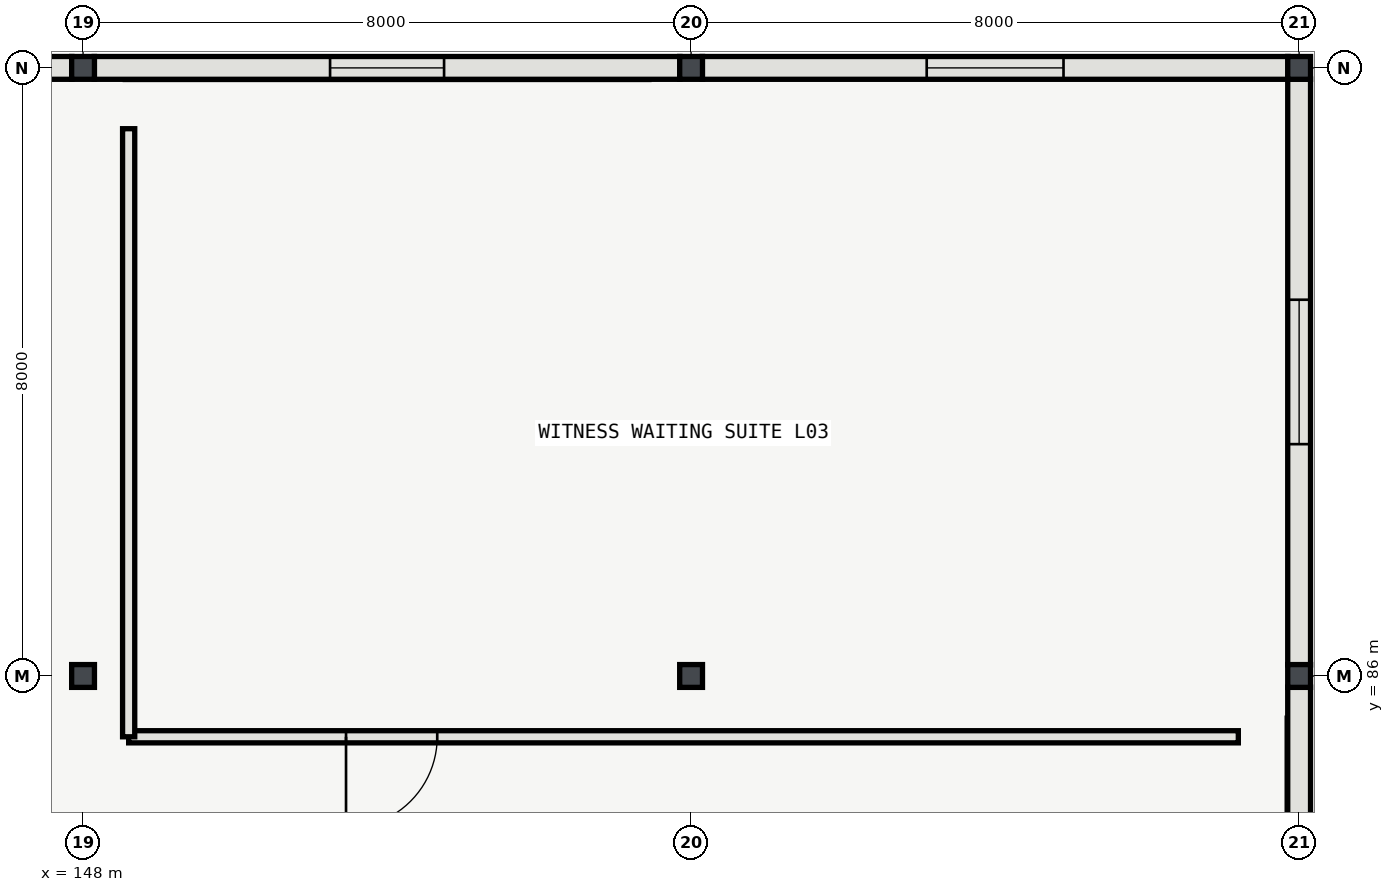
"""IFC4 building model, lengths in metres.
Left out: names, types, materials, properties, quantities, classifications, styles, units other than length and angle.
Written with IfcOpenShell. Run it as: python <this file> out.ifc"""

import sys

from ifc_helpers import new_model, si_unit, direction, frame, frame_2d, origin, origin_2d, place, context, subcontext, project, spatial, rectangle, i_section, extrude, element, fill, save


model = new_model("IFC4")
c1 = context("Model", 3, precision=1e-05, world=origin(), true_north=direction((0.0, 1.0)))
c2 = subcontext(c1, "Body", "Model", "MODEL_VIEW")
j1 = project(units=[si_unit("LENGTHUNIT", "METRE"), si_unit("PLANEANGLEUNIT", "RADIAN")], contexts=[c1])
p1 = place(None, origin())
s1 = spatial("IfcSite", under=j1, at=p1, CompositionType="ELEMENT")
p2 = place(p1, origin())
s2 = spatial("IfcBuilding", under=s1, at=p2, CompositionType="ELEMENT")
p3 = place(p2, frame((0.0, 0.0, 16.2)))
s3 = spatial("IfcBuildingStorey", under=s2, at=p3, CompositionType="ELEMENT", Elevation=16.2)
for number, where, z_axis, x_axis in (
    (1, (148.0, 86.0, 0.0), (0.0, 0.0, 1.0), (1.0, 0.0, 0.0)),
    (2, (148.0, 94.0, 0.0), (0.0, 0.0, 1.0), (1.0, 0.0, 0.0)),
    (3, (156.0, 86.0, 0.0), (0.0, 0.0, 1.0), (1.0, 0.0, 0.0)),
    (4, (156.0, 94.0, 0.0), (0.0, 0.0, 1.0), (1.0, 0.0, 0.0)),
    (5, (164.0, 86.0, 0.0), (0.0, 0.0, 1.0), (1.0, 0.0, 0.0)),
    (6, (164.0, 94.0, 0.0), (0.0, 0.0, 1.0), (1.0, 0.0, 0.0)),
):
    element("IfcColumn", number, at=place(p3, frame(where, z_axis=z_axis, x_axis=x_axis)), inside=s3, PredefinedType="COLUMN", context=c2, shape_type="SweptSolid", body=[
        extrude(i_section(OverallWidth=0.3, OverallDepth=0.3, WebThickness=0.01, FlangeThickness=0.015, FilletRadius=0.018, at=origin_2d()), origin(), (0.0, 0.0, 1.0), 4.2),
    ])
p4 = place(p3, frame((147.854, 94.0, 0.0), z_axis=(0.0, 0.0, 1.0), x_axis=(-1.0, 0.0, 0.0)))
e7 = element("IfcWall", 7, at=p4, inside=s3, PredefinedType="SOLIDWALL", context=c2, shape_type="SweptSolid", body=[
    extrude(rectangle(XDim=7.708, YDim=0.3, at=frame_2d((3.854, 0.0))), origin(), (0.0, 0.0, 1.0), 3.423),
])
p5 = place(p4, frame((2.654, 0.0, 0.95)))
e8 = element("IfcOpeningElement", 8, at=p5, cuts=e7, PredefinedType="OPENING", context=c2, shape_type="SweptSolid", body=[
    extrude(rectangle(XDim=2.4, YDim=1.8, at=frame_2d((1.2, 0.9))), frame((0.0, 0.16, 0.0), z_axis=(0.0, -1.0, 0.0), x_axis=(1.0, 0.0, 0.0)), (0.0, 0.0, 1.0), 0.32),
])
p6 = place(p3, frame((155.854, 94.0, 0.0), z_axis=(0.0, 0.0, 1.0), x_axis=(-1.0, 0.0, 0.0)))
e9 = element("IfcWall", 9, at=p6, inside=s3, PredefinedType="SOLIDWALL", context=c2, shape_type="SweptSolid", body=[
    extrude(rectangle(XDim=7.708, YDim=0.3, at=frame_2d((3.854, 0.0))), origin(), (0.0, 0.0, 1.0), 3.423),
])
p7 = place(p6, frame((3.104, 0.0, 0.95)))
e10 = element("IfcOpeningElement", 10, at=p7, cuts=e9, PredefinedType="OPENING", context=c2, shape_type="SweptSolid", body=[
    extrude(rectangle(XDim=1.5, YDim=1.2, at=frame_2d((0.75, 0.6))), frame((0.0, 0.16, 0.0), z_axis=(0.0, -1.0, 0.0), x_axis=(1.0, 0.0, 0.0)), (0.0, 0.0, 1.0), 0.32),
])
p8 = place(p3, frame((163.854, 94.0, 0.0), z_axis=(0.0, 0.0, 1.0), x_axis=(-1.0, 0.0, 0.0)))
e11 = element("IfcWall", 11, at=p8, inside=s3, PredefinedType="SOLIDWALL", context=c2, shape_type="SweptSolid", body=[
    extrude(rectangle(XDim=7.708, YDim=0.3, at=frame_2d((3.854, 0.0))), origin(), (0.0, 0.0, 1.0), 3.423),
])
p9 = place(p8, frame((2.954, 0.0, 0.95)))
e12 = element("IfcOpeningElement", 12, at=p9, cuts=e11, PredefinedType="OPENING", context=c2, shape_type="SweptSolid", body=[
    extrude(rectangle(XDim=1.8, YDim=1.2, at=frame_2d((0.9, 0.6))), frame((0.0, 0.16, 0.0), z_axis=(0.0, -1.0, 0.0), x_axis=(1.0, 0.0, 0.0)), (0.0, 0.0, 1.0), 0.32),
])
p10 = place(p3, frame((164.0, 78.146, 0.0), z_axis=(0.0, 0.0, 1.0), x_axis=(0.0, 1.0, 0.0)))
e13 = element("IfcWall", 13, at=p10, inside=s3, PredefinedType="SOLIDWALL", context=c2, shape_type="SweptSolid", body=[
    extrude(rectangle(XDim=7.708, YDim=0.3, at=frame_2d((3.854, 0.0))), origin(), (0.0, 0.0, 1.0), 3.383),
])
p11 = place(p10, frame((2.979, 0.0, 0.95)))
e14 = element("IfcOpeningElement", 14, at=p11, cuts=e13, PredefinedType="OPENING", context=c2, shape_type="SweptSolid", body=[
    extrude(rectangle(XDim=1.75, YDim=1.6, at=frame_2d((0.875, 0.8))), frame((0.0, 0.16, 0.0), z_axis=(0.0, -1.0, 0.0), x_axis=(1.0, 0.0, 0.0)), (0.0, 0.0, 1.0), 0.32),
])
p12 = place(p3, frame((164.0, 86.146, 0.0), z_axis=(0.0, 0.0, 1.0), x_axis=(0.0, 1.0, 0.0)))
e15 = element("IfcWall", 15, at=p12, inside=s3, PredefinedType="SOLIDWALL", context=c2, shape_type="SweptSolid", body=[
    extrude(rectangle(XDim=7.708, YDim=0.3, at=frame_2d((3.854, 0.0))), origin(), (0.0, 0.0, 1.0), 3.383),
])
p13 = place(p12, frame((2.904, 0.0, 0.95)))
e16 = element("IfcOpeningElement", 16, at=p13, cuts=e15, PredefinedType="OPENING", context=c2, shape_type="SweptSolid", body=[
    extrude(rectangle(XDim=1.9, YDim=1.6, at=frame_2d((0.95, 0.8))), frame((0.0, 0.16, 0.0), z_axis=(0.0, -1.0, 0.0), x_axis=(1.0, 0.0, 0.0)), (0.0, 0.0, 1.0), 0.32),
])
p14 = place(p3, frame((148.6, 85.2, 0.0), z_axis=(0.0, 0.0, 1.0), x_axis=(1.0, 0.0, 0.0)))
e17 = element("IfcWall", 17, at=p14, inside=s3, PredefinedType="PARTITIONING", context=c2, shape_type="SweptSolid", body=[
    extrude(rectangle(XDim=14.6, YDim=0.16, at=frame_2d((7.3, 0.0))), origin(), (0.0, 0.0, 1.0), 3.92),
])
p15 = place(p14, frame((2.86, 0.0, 0.0)))
e18 = element("IfcOpeningElement", 18, at=p15, cuts=e17, PredefinedType="OPENING", context=c2, shape_type="SweptSolid", body=[
    extrude(rectangle(XDim=1.2, YDim=2.2, at=frame_2d((0.6, 1.1))), frame((0.0, 0.09, 0.0), z_axis=(0.0, -1.0, 0.0), x_axis=(1.0, 0.0, 0.0)), (0.0, 0.0, 1.0), 0.18),
])
p16 = place(p3, frame((148.6, 93.2, 0.0), z_axis=(0.0, 0.0, 1.0), x_axis=(0.0, -1.0, 0.0)))
e19 = element("IfcWall", 19, at=p16, inside=s3, PredefinedType="PARTITIONING", context=c2, shape_type="SweptSolid", body=[
    extrude(rectangle(XDim=8.0, YDim=0.16, at=frame_2d((4.0, 0.0))), origin(), (0.0, 0.0, 1.0), 3.92),
])
p17 = place(p7, origin())
e20 = element("IfcWindow", 20, at=p17, inside=s3, PartitioningType="SINGLE_PANEL", PredefinedType="WINDOW", context=c2, shape_type="SweptSolid", body=[
    extrude(rectangle(XDim=1.5, YDim=1.2, at=frame_2d((0.75, 0.6))), frame((0.0, 0.03, 0.0), z_axis=(0.0, -1.0, 0.0), x_axis=(1.0, 0.0, 0.0)), (0.0, 0.0, 1.0), 0.06),
])
fill(e10, e20)
p18 = place(p9, origin())
e21 = element("IfcWindow", 21, at=p18, inside=s3, PartitioningType="SINGLE_PANEL", PredefinedType="WINDOW", context=c2, shape_type="SweptSolid", body=[
    extrude(rectangle(XDim=1.8, YDim=1.2, at=frame_2d((0.9, 0.6))), frame((0.0, 0.03, 0.0), z_axis=(0.0, -1.0, 0.0), x_axis=(1.0, 0.0, 0.0)), (0.0, 0.0, 1.0), 0.06),
])
fill(e12, e21)
p19 = place(p13, origin())
e22 = element("IfcWindow", 22, at=p19, inside=s3, PartitioningType="SINGLE_PANEL", PredefinedType="WINDOW", context=c2, shape_type="SweptSolid", body=[
    extrude(rectangle(XDim=1.9, YDim=1.6, at=frame_2d((0.95, 0.8))), frame((0.0, 0.03, 0.0), z_axis=(0.0, -1.0, 0.0), x_axis=(1.0, 0.0, 0.0)), (0.0, 0.0, 1.0), 0.06),
])
fill(e16, e22)
p20 = place(p15, origin())
e23 = element("IfcDoor", 23, at=p20, inside=s3, OperationType="SINGLE_SWING_LEFT", PredefinedType="DOOR", context=c2, shape_type="SweptSolid", body=[
    extrude(rectangle(XDim=1.2, YDim=2.2, at=frame_2d((0.6, 1.1))), frame((0.0, 0.025, 0.0), z_axis=(0.0, -1.0, 0.0), x_axis=(1.0, 0.0, 0.0)), (0.0, 0.0, 1.0), 0.05),
])
fill(e18, e23)
save(model, sys.argv[1])
